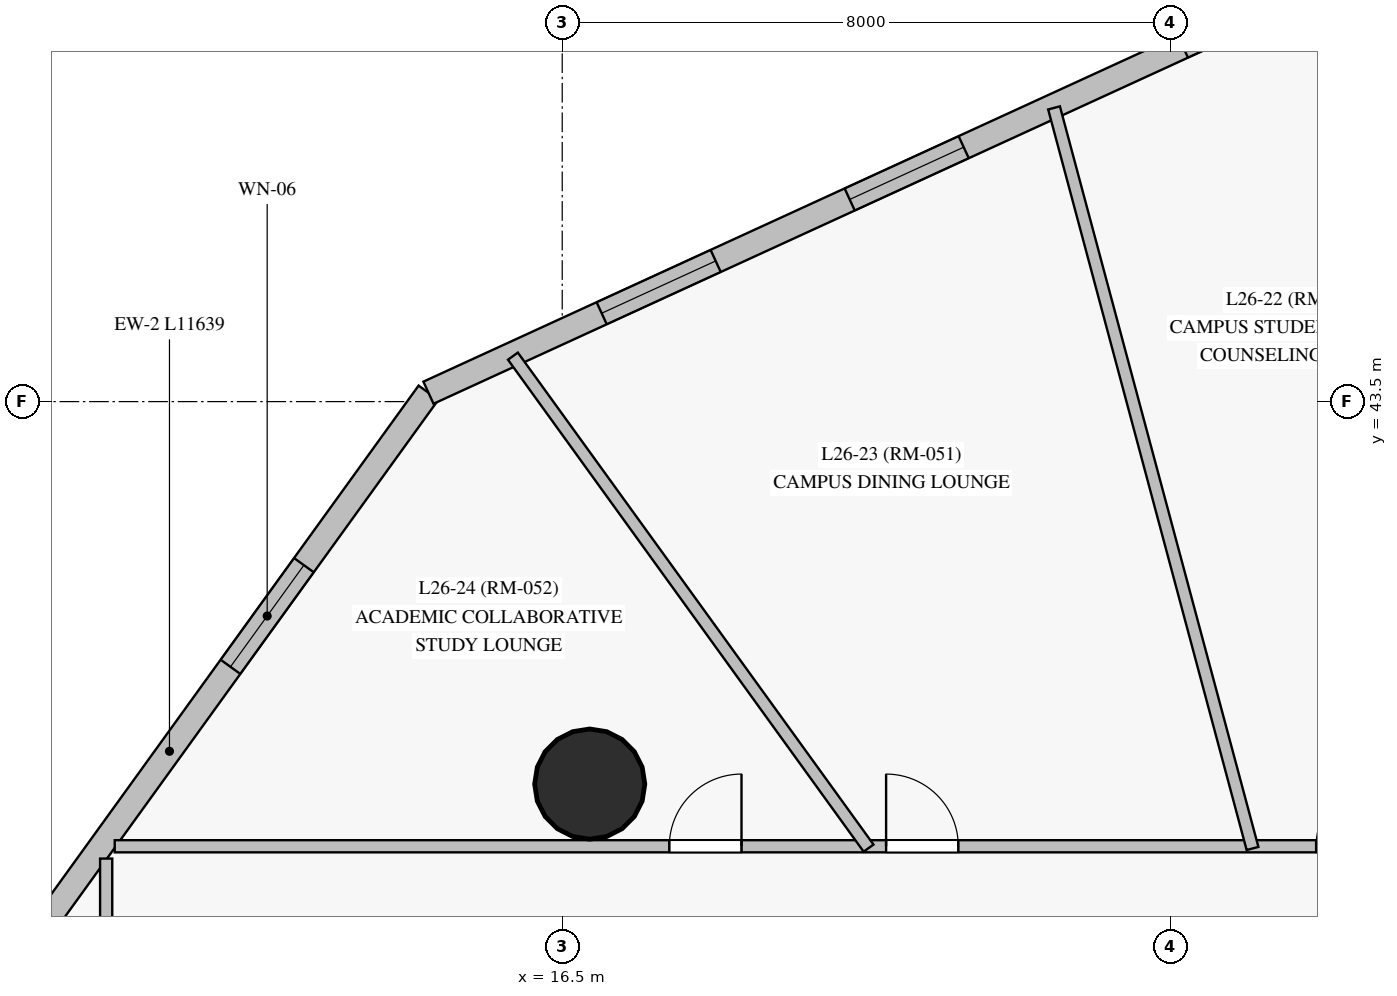
"""IFC4 building model, lengths in metres.
Left out: names, types, materials, properties, quantities, classifications, styles, units other than length and angle.
Written with IfcOpenShell. Run it as: python <this file> out.ifc"""

import sys

from ifc_helpers import new_model, si_unit, direction, frame, frame_2d, origin, origin_with_axes, origin_2d, place, context, subcontext, project, spatial, rectangle, circle, extrude, source, transform, mapped, element, fill, save


model = new_model("IFC4")
c1 = context("Model", 3, precision=1e-05, world=origin(), true_north=direction((0.0, 1.0)))
c2 = subcontext(c1, "Body", "Model", "MODEL_VIEW")
j1 = project(units=[si_unit("LENGTHUNIT", "METRE"), si_unit("PLANEANGLEUNIT", "RADIAN")], contexts=[c1])
p1 = place(None, origin())
s1 = spatial("IfcSite", under=j1, at=p1, CompositionType="ELEMENT")
p2 = place(p1, origin())
s2 = spatial("IfcBuilding", under=s1, at=p2, CompositionType="ELEMENT")
p3 = place(p2, frame((0.0, 0.0, 99.25)))
s3 = spatial("IfcBuildingStorey", under=s2, at=p3, CompositionType="ELEMENT", Elevation=99.25)
m1 = source(origin_with_axes(), c2, "Body", "SweptSolid", [
    extrude(circle(Radius=0.725, at=origin_2d()), origin(), (0.0, 0.0, 1.0), 3.05),
])
p4 = place(p3, frame((16.862, 38.468, 0.0), z_axis=(0.0, 0.0, 1.0), x_axis=(1.0, 0.0, 0.0)))
e1 = element("IfcColumn", 1, at=p4, inside=s3, PredefinedType="COLUMN", context=c2, shape_type="MappedRepresentation", body=[
    mapped(m1, transform((0.0, 0.0, 0.0), scale=1.0)),
])
p5 = place(p3, frame((14.74, 43.617, 0.0), z_axis=(0.0, 0.0, 1.0), x_axis=(-0.585528081862, -0.81065212351, 0.0)))
e2 = element("IfcWall", 2, at=p5, inside=s3, PredefinedType="SOLIDWALL", context=c2, shape_type="SweptSolid", body=[
    extrude(rectangle(XDim=11.638, YDim=0.32, at=frame_2d((5.819, 0.0))), origin(), (0.0, 0.0, 1.0), 2.825),
])
p6 = place(p5, frame((2.799, 0.0, 0.85)))
e3 = element("IfcOpeningElement", 3, at=p6, cuts=e2, PredefinedType="OPENING", context=c2, shape_type="SweptSolid", body=[
    extrude(rectangle(XDim=1.65, YDim=1.65, at=frame_2d((0.825, 0.825))), frame((0.0, 0.17, 0.0), z_axis=(0.0, -1.0, 0.0), x_axis=(1.0, 0.0, 0.0)), (0.0, 0.0, 1.0), 0.34),
])
p7 = place(p5, frame((8.751, 0.0, 0.85)))
e4 = element("IfcOpeningElement", 4, at=p7, cuts=e2, PredefinedType="OPENING", context=c2, shape_type="SweptSolid", body=[
    extrude(rectangle(XDim=1.65, YDim=1.65, at=frame_2d((0.825, 0.825))), frame((0.0, 0.17, 0.0), z_axis=(0.0, -1.0, 0.0), x_axis=(1.0, 0.0, 0.0)), (0.0, 0.0, 1.0), 0.34),
])
p8 = place(p3, frame((27.932, 49.669, 0.0), z_axis=(0.0, 0.0, 1.0), x_axis=(-0.908921945333, -0.416966302345, 0.0)))
e5 = element("IfcWall", 5, at=p8, inside=s3, PredefinedType="SOLIDWALL", context=c2, shape_type="SweptSolid", body=[
    extrude(rectangle(XDim=14.514, YDim=0.32, at=frame_2d((7.257, 0.0))), origin(), (0.0, 0.0, 1.0), 2.825),
])
p9 = place(p8, frame((1.943, 0.0, 0.85)))
e6 = element("IfcOpeningElement", 6, at=p9, cuts=e5, PredefinedType="OPENING", context=c2, shape_type="SweptSolid", body=[
    extrude(rectangle(XDim=1.65, YDim=1.65, at=frame_2d((0.825, 0.825))), frame((0.0, 0.17, 0.0), z_axis=(0.0, -1.0, 0.0), x_axis=(1.0, 0.0, 0.0)), (0.0, 0.0, 1.0), 0.34),
])
p10 = place(p8, frame((6.767, 0.0, 0.85)))
e7 = element("IfcOpeningElement", 7, at=p10, cuts=e5, PredefinedType="OPENING", context=c2, shape_type="SweptSolid", body=[
    extrude(rectangle(XDim=1.65, YDim=1.65, at=frame_2d((0.825, 0.825))), frame((0.0, 0.17, 0.0), z_axis=(0.0, -1.0, 0.0), x_axis=(1.0, 0.0, 0.0)), (0.0, 0.0, 1.0), 0.34),
])
p11 = place(p8, frame((10.357, 0.0, 0.85)))
e8 = element("IfcOpeningElement", 8, at=p11, cuts=e5, PredefinedType="OPENING", context=c2, shape_type="SweptSolid", body=[
    extrude(rectangle(XDim=1.65, YDim=1.65, at=frame_2d((0.825, 0.825))), frame((0.0, 0.17, 0.0), z_axis=(0.0, -1.0, 0.0), x_axis=(1.0, 0.0, 0.0)), (0.0, 0.0, 1.0), 0.34),
])
p12 = place(p3, frame((10.613, 37.65, 0.0), z_axis=(0.0, 0.0, 1.0), x_axis=(1.0, 0.0, 0.0)))
e9 = element("IfcWall", 9, at=p12, inside=s3, PredefinedType="PARTITIONING", context=c2, shape_type="SweptSolid", body=[
    extrude(rectangle(XDim=29.637, YDim=0.16, at=frame_2d((14.819, 0.0))), origin(), (0.0, 0.0, 1.0), 2.325),
])
p13 = place(p12, frame((27.147, 0.0, 0.0)))
e10 = element("IfcOpeningElement", 10, at=p13, cuts=e9, PredefinedType="OPENING", context=c2, shape_type="SweptSolid", body=[
    extrude(rectangle(XDim=0.95, YDim=2.15, at=frame_2d((0.475, 1.075))), frame((0.0, 0.09, 0.0), z_axis=(0.0, -1.0, 0.0), x_axis=(1.0, 0.0, 0.0)), (0.0, 0.0, 1.0), 0.18),
])
p14 = place(p12, frame((24.44, 0.0, 0.0)))
e11 = element("IfcOpeningElement", 11, at=p14, cuts=e9, PredefinedType="OPENING", context=c2, shape_type="SweptSolid", body=[
    extrude(rectangle(XDim=0.95, YDim=2.15, at=frame_2d((0.475, 1.075))), frame((0.0, 0.09, 0.0), z_axis=(0.0, -1.0, 0.0), x_axis=(1.0, 0.0, 0.0)), (0.0, 0.0, 1.0), 0.18),
])
p15 = place(p12, frame((22.358, 0.0, 0.0)))
e12 = element("IfcOpeningElement", 12, at=p15, cuts=e9, PredefinedType="OPENING", context=c2, shape_type="SweptSolid", body=[
    extrude(rectangle(XDim=0.95, YDim=2.15, at=frame_2d((0.475, 1.075))), frame((0.0, 0.09, 0.0), z_axis=(0.0, -1.0, 0.0), x_axis=(1.0, 0.0, 0.0)), (0.0, 0.0, 1.0), 0.18),
])
p16 = place(p12, frame((20.084, 0.0, 0.0)))
e13 = element("IfcOpeningElement", 13, at=p16, cuts=e9, PredefinedType="OPENING", context=c2, shape_type="SweptSolid", body=[
    extrude(rectangle(XDim=0.95, YDim=2.15, at=frame_2d((0.475, 1.075))), frame((0.0, 0.09, 0.0), z_axis=(0.0, -1.0, 0.0), x_axis=(1.0, 0.0, 0.0)), (0.0, 0.0, 1.0), 0.18),
])
p17 = place(p12, frame((18.225, 0.0, 0.0)))
e14 = element("IfcOpeningElement", 14, at=p17, cuts=e9, PredefinedType="OPENING", context=c2, shape_type="SweptSolid", body=[
    extrude(rectangle(XDim=0.95, YDim=2.15, at=frame_2d((0.475, 1.075))), frame((0.0, 0.09, 0.0), z_axis=(0.0, -1.0, 0.0), x_axis=(1.0, 0.0, 0.0)), (0.0, 0.0, 1.0), 0.18),
])
p18 = place(p12, frame((15.805, 0.0, 0.0)))
e15 = element("IfcOpeningElement", 15, at=p18, cuts=e9, PredefinedType="OPENING", context=c2, shape_type="SweptSolid", body=[
    extrude(rectangle(XDim=0.95, YDim=2.15, at=frame_2d((0.475, 1.075))), frame((0.0, 0.09, 0.0), z_axis=(0.0, -1.0, 0.0), x_axis=(1.0, 0.0, 0.0)), (0.0, 0.0, 1.0), 0.18),
])
p19 = place(p12, frame((10.148, 0.0, 0.0)))
e16 = element("IfcOpeningElement", 16, at=p19, cuts=e9, PredefinedType="OPENING", context=c2, shape_type="SweptSolid", body=[
    extrude(rectangle(XDim=0.95, YDim=2.15, at=frame_2d((0.475, 1.075))), frame((0.0, 0.09, 0.0), z_axis=(0.0, -1.0, 0.0), x_axis=(1.0, 0.0, 0.0)), (0.0, 0.0, 1.0), 0.18),
])
p20 = place(p12, frame((7.296, 0.0, 0.0)))
e17 = element("IfcOpeningElement", 17, at=p20, cuts=e9, PredefinedType="OPENING", context=c2, shape_type="SweptSolid", body=[
    extrude(rectangle(XDim=0.95, YDim=2.15, at=frame_2d((0.475, 1.075))), frame((0.0, 0.09, 0.0), z_axis=(0.0, -1.0, 0.0), x_axis=(1.0, 0.0, 0.0)), (0.0, 0.0, 1.0), 0.18),
])
p21 = place(p3, frame((10.5, 15.35, 0.0), z_axis=(0.0, 0.0, 1.0), x_axis=(0.0, 1.0, 0.0)))
e18 = element("IfcWall", 18, at=p21, inside=s3, PredefinedType="PARTITIONING", context=c2, shape_type="SweptSolid", body=[
    extrude(rectangle(XDim=22.138, YDim=0.16, at=frame_2d((11.069, 0.0))), origin(), (0.0, 0.0, 1.0), 2.825),
])
p22 = place(p21, frame((5.021, 0.0, 0.0)))
e19 = element("IfcOpeningElement", 19, at=p22, cuts=e18, PredefinedType="OPENING", context=c2, shape_type="SweptSolid", body=[
    extrude(rectangle(XDim=0.96, YDim=2.15, at=frame_2d((0.48, 1.075))), frame((0.0, 0.09, 0.0), z_axis=(0.0, -1.0, 0.0), x_axis=(1.0, 0.0, 0.0)), (0.0, 0.0, 1.0), 0.18),
])
p23 = place(p21, frame((10.518, 0.0, 0.0)))
e20 = element("IfcOpeningElement", 20, at=p23, cuts=e18, PredefinedType="OPENING", context=c2, shape_type="SweptSolid", body=[
    extrude(rectangle(XDim=0.95, YDim=2.15, at=frame_2d((0.475, 1.075))), frame((0.0, 0.09, 0.0), z_axis=(0.0, -1.0, 0.0), x_axis=(1.0, 0.0, 0.0)), (0.0, 0.0, 1.0), 0.18),
])
p24 = place(p3, frame((25.582, 37.621, 0.0), z_axis=(0.0, 0.0, 1.0), x_axis=(-0.258863116835, 0.965914016226, 0.0)))
e21 = element("IfcWall", 21, at=p24, inside=s3, PredefinedType="PARTITIONING", context=c2, shape_type="SweptSolid", body=[
    extrude(rectangle(XDim=10.087, YDim=0.16, at=frame_2d((5.043, 0.0))), origin(), (0.0, 0.0, 1.0), 2.825),
])
p25 = place(p3, frame((20.531, 37.626, 0.0), z_axis=(0.0, 0.0, 1.0), x_axis=(-0.585890053076, 0.810390551343, 0.0)))
e22 = element("IfcWall", 22, at=p25, inside=s3, PredefinedType="PARTITIONING", context=c2, shape_type="SweptSolid", body=[
    extrude(rectangle(XDim=7.987, YDim=0.16, at=frame_2d((3.993, 0.0))), origin(), (0.0, 0.0, 1.0), 2.825),
])
m2 = source(origin_with_axes(), c2, "Body", "SweptSolid", [
    extrude(rectangle(XDim=1.65, YDim=1.65, at=frame_2d((0.825, 0.825))), frame((0.0, 0.03, 0.0), z_axis=(0.0, -1.0, 0.0), x_axis=(1.0, 0.0, 0.0)), (0.0, 0.0, 1.0), 0.06),
])
p26 = place(p6, origin())
e23 = element("IfcWindow", 23, at=p26, inside=s3, PartitioningType="SINGLE_PANEL", PredefinedType="WINDOW", context=c2, shape_type="MappedRepresentation", body=[
    mapped(m2, transform((0.0, 0.0, 0.0), scale=1.0)),
])
fill(e3, e23)
p27 = place(p10, origin())
e24 = element("IfcWindow", 24, at=p27, inside=s3, PartitioningType="SINGLE_PANEL", PredefinedType="WINDOW", context=c2, shape_type="MappedRepresentation", body=[
    mapped(m2, transform((0.0, 0.0, 0.0), scale=1.0)),
])
fill(e7, e24)
p28 = place(p11, origin())
e25 = element("IfcWindow", 25, at=p28, inside=s3, PartitioningType="SINGLE_PANEL", PredefinedType="WINDOW", context=c2, shape_type="MappedRepresentation", body=[
    mapped(m2, transform((0.0, 0.0, 0.0), scale=1.0)),
])
fill(e8, e25)
m3 = source(origin_with_axes(), c2, "Body", "SweptSolid", [
    extrude(rectangle(XDim=0.95, YDim=2.15, at=frame_2d((0.475, 1.075))), frame((0.0, 0.025, 0.0), z_axis=(0.0, -1.0, 0.0), x_axis=(1.0, 0.0, 0.0)), (0.0, 0.0, 1.0), 0.05),
])
p29 = place(p18, origin())
e26 = element("IfcDoor", 26, at=p29, inside=s3, OperationType="SINGLE_SWING_RIGHT", PredefinedType="DOOR", context=c2, shape_type="MappedRepresentation", body=[
    mapped(m3, transform((0.0, 0.0, 0.0), scale=1.0)),
])
fill(e15, e26)
p30 = place(p19, origin())
e27 = element("IfcDoor", 27, at=p30, inside=s3, OperationType="SINGLE_SWING_LEFT", PredefinedType="DOOR", context=c2, shape_type="MappedRepresentation", body=[
    mapped(m3, transform((0.0, 0.0, 0.0), scale=1.0)),
])
fill(e16, e27)
p31 = place(p20, origin())
e28 = element("IfcDoor", 28, at=p31, inside=s3, OperationType="SINGLE_SWING_RIGHT", PredefinedType="DOOR", context=c2, shape_type="MappedRepresentation", body=[
    mapped(m3, transform((0.0, 0.0, 0.0), scale=1.0)),
])
fill(e17, e28)
save(model, sys.argv[1])
